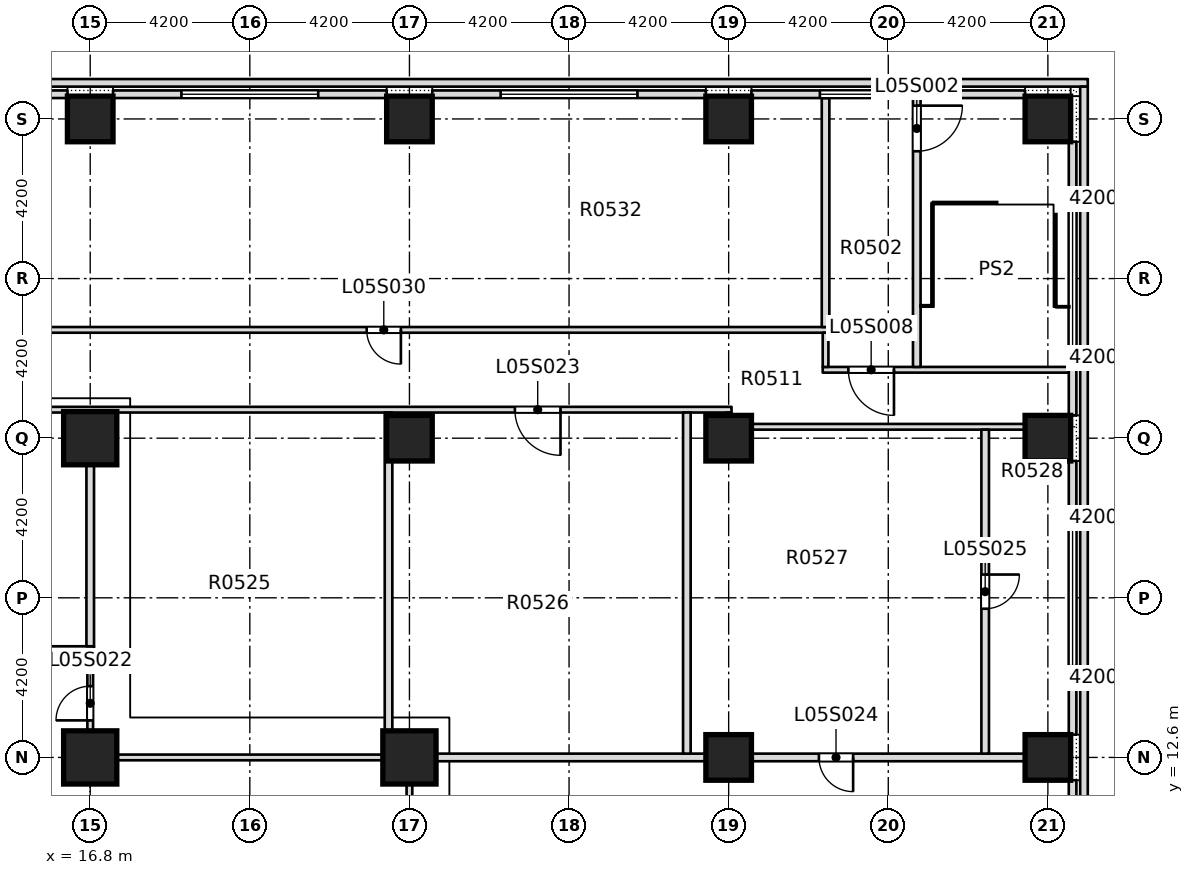
"""IFC4 building model, lengths in metres.
Left out: names, types, materials, properties, quantities, classifications, styles, units other than length and angle.
Written with IfcOpenShell. Run it as: python <this file> out.ifc"""

import sys

from ifc_helpers import new_model, si_unit, direction, frame, frame_2d, origin, origin_2d, place, context, subcontext, project, spatial, rectangle, extrude, element, fill, save


model = new_model("IFC4")
c1 = context("Model", 3, precision=1e-05, world=origin(), true_north=direction((0.0, 1.0)))
c2 = subcontext(c1, "Body", "Model", "MODEL_VIEW")
j1 = project(units=[si_unit("LENGTHUNIT", "METRE"), si_unit("PLANEANGLEUNIT", "RADIAN")], contexts=[c1])
p1 = place(None, origin())
s1 = spatial("IfcSite", under=j1, at=p1, CompositionType="ELEMENT")
p2 = place(p1, origin())
s2 = spatial("IfcBuilding", under=s1, at=p2, CompositionType="ELEMENT")
p3 = place(p2, frame((0.0, 0.0, 30.0)))
s3 = spatial("IfcBuildingStorey", under=s2, at=p3, CompositionType="ELEMENT", Elevation=30.0)
for number, where, z_axis, x_axis in (
    (1, (16.8, 12.6, -0.4), (0.0, 0.0, 1.0), (1.0, 0.0, 0.0)),
    (2, (25.2, 12.6, -0.4), (0.0, 0.0, 1.0), (1.0, 0.0, 0.0)),
    (3, (16.8, 21.0, -0.4), (0.0, 0.0, 1.0), (1.0, 0.0, 0.0)),
):
    element("IfcColumn", number, at=place(p3, frame(where, z_axis=z_axis, x_axis=x_axis)), inside=s3, PredefinedType="COLUMN", context=c2, shape_type="SweptSolid", body=[
        extrude(rectangle(XDim=1.4, YDim=1.4, at=origin_2d()), origin(), (0.0, 0.0, 1.0), 4.58),
    ])
for number, where, z_axis, x_axis in (
    (4, (33.6, 12.6, 0.0), (0.0, 0.0, 1.0), (1.0, 0.0, 0.0)),
    (5, (42.0, 12.6, 0.0), (0.0, 0.0, 1.0), (1.0, 0.0, 0.0)),
    (6, (25.2, 21.0, 0.0), (0.0, 0.0, 1.0), (1.0, 0.0, 0.0)),
    (7, (33.6, 21.0, 0.0), (0.0, 0.0, 1.0), (1.0, 0.0, 0.0)),
    (8, (42.0, 21.0, 0.0), (0.0, 0.0, 1.0), (1.0, 0.0, 0.0)),
    (9, (16.8, 29.4, 0.0), (0.0, 0.0, 1.0), (1.0, 0.0, 0.0)),
    (10, (25.2, 29.4, 0.0), (0.0, 0.0, 1.0), (1.0, 0.0, 0.0)),
    (11, (33.6, 29.4, 0.0), (0.0, 0.0, 1.0), (1.0, 0.0, 0.0)),
    (12, (42.0, 29.4, 0.0), (0.0, 0.0, 1.0), (1.0, 0.0, 0.0)),
):
    element("IfcColumn", number, at=place(p3, frame(where, z_axis=z_axis, x_axis=x_axis)), inside=s3, PredefinedType="COLUMN", context=c2, shape_type="SweptSolid", body=[
        extrude(rectangle(XDim=1.2, YDim=1.2, at=origin_2d()), origin(), (0.0, 0.0, 1.0), 4.18),
    ])
p4 = place(p3, frame((-26.25, 30.35, 4.5), z_axis=(0.0, 0.0, 1.0), x_axis=(1.0, 0.0, 0.0)))
e13 = element("IfcWall", 13, at=p4, inside=s3, PredefinedType="PARAPET", context=c2, shape_type="SweptSolid", body=[
    extrude(rectangle(XDim=69.3, YDim=0.2, at=frame_2d((34.65, 0.0))), origin(), (0.0, 0.0, 1.0), 1.2),
])
p5 = place(p3, frame((42.95, -21.85, 4.5), z_axis=(0.0, 0.0, 1.0), x_axis=(0.0, 1.0, 0.0)))
e14 = element("IfcWall", 14, at=p5, inside=s3, PredefinedType="PARAPET", context=c2, shape_type="SweptSolid", body=[
    extrude(rectangle(XDim=52.1, YDim=0.2, at=frame_2d((26.05, 0.0))), origin(), (0.0, 0.0, 1.0), 1.2),
])
p6 = place(p3, frame((16.725, 12.6, 0.0), z_axis=(0.0, 0.0, 1.0), x_axis=(1.0, 0.0, 0.0)))
e15 = element("IfcWall", 15, at=p6, inside=s3, PredefinedType="PARTITIONING", context=c2, shape_type="SweptSolid", body=[
    extrude(rectangle(XDim=8.55, YDim=0.15, at=frame_2d((4.275, 0.0))), origin(), (0.0, 0.0, 1.0), 4.18),
])
p7 = place(p3, frame((25.125, 12.6, 0.0), z_axis=(0.0, 0.0, 1.0), x_axis=(1.0, 0.0, 0.0)))
e16 = element("IfcWall", 16, at=p7, inside=s3, PredefinedType="PARTITIONING", context=c2, shape_type="SweptSolid", body=[
    extrude(rectangle(XDim=17.425, YDim=0.2, at=frame_2d((8.712, 0.0))), origin(), (0.0, 0.0, 1.0), 4.18),
])
p8 = place(p7, frame((10.85, 0.0, 0.0)))
e17 = element("IfcOpeningElement", 17, at=p8, cuts=e16, PredefinedType="OPENING", context=c2, shape_type="SweptSolid", body=[
    extrude(rectangle(XDim=0.9, YDim=2.1, at=frame_2d((0.45, 1.05))), frame((0.0, 0.11, 0.0), z_axis=(0.0, -1.0, 0.0), x_axis=(1.0, 0.0, 0.0)), (0.0, 0.0, 1.0), 0.22),
])
p9 = place(p3, frame((12.601, 15.45, 0.0), z_axis=(0.0, 0.0, 1.0), x_axis=(1.0, 0.0, 0.0)))
e18 = element("IfcWall", 18, at=p9, inside=s3, PredefinedType="PARTITIONING", context=c2, shape_type="SweptSolid", body=[
    extrude(rectangle(XDim=4.299, YDim=0.15, at=frame_2d((2.149, 0.0))), origin(), (0.0, 0.0, 1.0), 4.18),
])
p10 = place(p9, frame((1.549, 0.0, 0.0)))
e19 = element("IfcOpeningElement", 19, at=p10, cuts=e18, PredefinedType="OPENING", context=c2, shape_type="SweptSolid", body=[
    extrude(rectangle(XDim=1.1, YDim=2.1, at=frame_2d((0.55, 1.05))), frame((0.0, 0.085, 0.0), z_axis=(0.0, -1.0, 0.0), x_axis=(1.0, 0.0, 0.0)), (0.0, 0.0, 1.0), 0.17),
])
p11 = place(p3, frame((33.525, 21.3, 0.0), z_axis=(0.0, 0.0, 1.0), x_axis=(1.0, 0.0, 0.0)))
e20 = element("IfcWall", 20, at=p11, inside=s3, PredefinedType="PARTITIONING", context=c2, shape_type="SweptSolid", body=[
    extrude(rectangle(XDim=9.025, YDim=0.15, at=frame_2d((4.513, 0.0))), origin(), (0.0, 0.0, 1.0), 4.18),
])
p12 = place(p3, frame((12.601, 21.75, 0.0), z_axis=(0.0, 0.0, 1.0), x_axis=(1.0, 0.0, 0.0)))
e21 = element("IfcWall", 21, at=p12, inside=s3, PredefinedType="PARTITIONING", context=c2, shape_type="SweptSolid", body=[
    extrude(rectangle(XDim=21.074, YDim=0.15, at=frame_2d((10.537, 0.0))), origin(), (0.0, 0.0, 1.0), 4.18),
])
p13 = place(p12, frame((15.374, 0.0, 0.0)))
e22 = element("IfcOpeningElement", 22, at=p13, cuts=e21, PredefinedType="OPENING", context=c2, shape_type="SweptSolid", body=[
    extrude(rectangle(XDim=1.2, YDim=2.1, at=frame_2d((0.6, 1.05))), frame((0.0, 0.085, 0.0), z_axis=(0.0, -1.0, 0.0), x_axis=(1.0, 0.0, 0.0)), (0.0, 0.0, 1.0), 0.17),
])
p14 = place(p3, frame((36.075, 22.8, 0.0), z_axis=(0.0, 0.0, 1.0), x_axis=(1.0, 0.0, 0.0)))
e23 = element("IfcWall", 23, at=p14, inside=s3, PredefinedType="PARTITIONING", context=c2, shape_type="SweptSolid", body=[
    extrude(rectangle(XDim=6.475, YDim=0.15, at=frame_2d((3.238, 0.0))), origin(), (0.0, 0.0, 1.0), 4.18),
])
p15 = place(p14, frame((0.675, 0.0, 0.0)))
e24 = element("IfcOpeningElement", 24, at=p15, cuts=e23, PredefinedType="OPENING", context=c2, shape_type="SweptSolid", body=[
    extrude(rectangle(XDim=1.2, YDim=2.1, at=frame_2d((0.6, 1.05))), frame((0.0, 0.085, 0.0), z_axis=(0.0, -1.0, 0.0), x_axis=(1.0, 0.0, 0.0)), (0.0, 0.0, 1.0), 0.17),
])
p16 = place(p3, frame((8.65, 23.85, 0.0), z_axis=(0.0, 0.0, 1.0), x_axis=(1.0, 0.0, 0.0)))
e25 = element("IfcWall", 25, at=p16, inside=s3, PredefinedType="PARTITIONING", context=c2, shape_type="SweptSolid", body=[
    extrude(rectangle(XDim=27.6, YDim=0.15, at=frame_2d((13.8, 0.0))), origin(), (0.0, 0.0, 1.0), 4.18),
])
p17 = place(p16, frame((1.7, 0.0, 0.0)))
e26 = element("IfcOpeningElement", 26, at=p17, cuts=e25, PredefinedType="OPENING", context=c2, shape_type="SweptSolid", body=[
    extrude(rectangle(XDim=0.9, YDim=2.1, at=frame_2d((0.45, 1.05))), frame((0.0, 0.085, 0.0), z_axis=(0.0, -1.0, 0.0), x_axis=(1.0, 0.0, 0.0)), (0.0, 0.0, 1.0), 0.17),
])
p18 = place(p16, frame((15.425, 0.0, 0.0)))
e27 = element("IfcOpeningElement", 27, at=p18, cuts=e25, PredefinedType="OPENING", context=c2, shape_type="SweptSolid", body=[
    extrude(rectangle(XDim=0.9, YDim=2.1, at=frame_2d((0.45, 1.05))), frame((0.0, 0.085, 0.0), z_axis=(0.0, -1.0, 0.0), x_axis=(1.0, 0.0, 0.0)), (0.0, 0.0, 1.0), 0.17),
])
p19 = place(p3, frame((16.8, 12.675, 0.0), z_axis=(0.0, 0.0, 1.0), x_axis=(0.0, 1.0, 0.0)))
e28 = element("IfcWall", 28, at=p19, inside=s3, PredefinedType="PARTITIONING", context=c2, shape_type="SweptSolid", body=[
    extrude(rectangle(XDim=2.7, YDim=0.15, at=frame_2d((1.35, 0.0))), origin(), (0.0, 0.0, 1.0), 4.18),
])
p20 = place(p19, frame((0.9, 0.0, 0.0)))
e29 = element("IfcOpeningElement", 29, at=p20, cuts=e28, PredefinedType="OPENING", context=c2, shape_type="SweptSolid", body=[
    extrude(rectangle(XDim=0.9, YDim=2.1, at=frame_2d((0.45, 1.05))), frame((0.0, 0.085, 0.0), z_axis=(0.0, -1.0, 0.0), x_axis=(1.0, 0.0, 0.0)), (0.0, 0.0, 1.0), 0.17),
])
p21 = place(p3, frame((16.8, 15.525, 0.0), z_axis=(0.0, 0.0, 1.0), x_axis=(0.0, 1.0, 0.0)))
e30 = element("IfcWall", 30, at=p21, inside=s3, PredefinedType="PARTITIONING", context=c2, shape_type="SweptSolid", body=[
    extrude(rectangle(XDim=6.15, YDim=0.2, at=frame_2d((3.075, 0.0))), origin(), (0.0, 0.0, 1.0), 4.18),
])
p22 = place(p3, frame((24.65, 12.675, 0.0), z_axis=(0.0, 0.0, 1.0), x_axis=(0.0, 1.0, 0.0)))
e31 = element("IfcWall", 31, at=p22, inside=s3, PredefinedType="PARTITIONING", context=c2, shape_type="SweptSolid", body=[
    extrude(rectangle(XDim=9.0, YDim=0.2, at=frame_2d((4.5, 0.0))), origin(), (0.0, 0.0, 1.0), 4.18),
])
p23 = place(p3, frame((25.2, -11.8, 0.0), z_axis=(0.0, 0.0, 1.0), x_axis=(0.0, 1.0, 0.0)))
e32 = element("IfcWall", 32, at=p23, inside=s3, PredefinedType="PARTITIONING", context=c2, shape_type="SweptSolid", body=[
    extrude(rectangle(XDim=24.3, YDim=0.15, at=frame_2d((12.15, 0.0))), origin(), (0.0, 0.0, 1.0), 4.18),
])
p24 = place(p23, frame((11.25, 0.0, 0.0)))
e33 = element("IfcOpeningElement", 33, at=p24, cuts=e32, PredefinedType="OPENING", context=c2, shape_type="SweptSolid", body=[
    extrude(rectangle(XDim=1.8, YDim=2.1, at=frame_2d((0.9, 1.05))), frame((0.0, 0.085, 0.0), z_axis=(0.0, -1.0, 0.0), x_axis=(1.0, 0.0, 0.0)), (0.0, 0.0, 1.0), 0.17),
])
p25 = place(p3, frame((32.5, 12.7, 0.0), z_axis=(0.0, 0.0, 1.0), x_axis=(0.0, 1.0, 0.0)))
e34 = element("IfcWall", 34, at=p25, inside=s3, PredefinedType="PARTITIONING", context=c2, shape_type="SweptSolid", body=[
    extrude(rectangle(XDim=8.975, YDim=0.2, at=frame_2d((4.488, 0.0))), origin(), (0.0, 0.0, 1.0), 4.18),
])
p26 = place(p3, frame((33.6, 21.375, 0.0), z_axis=(0.0, 0.0, 1.0), x_axis=(0.0, 1.0, 0.0)))
e35 = element("IfcWall", 35, at=p26, inside=s3, PredefinedType="PARTITIONING", context=c2, shape_type="SweptSolid", body=[
    extrude(rectangle(XDim=0.3, YDim=0.15, at=frame_2d((0.15, 0.0))), origin(), (0.0, 0.0, 1.0), 4.18),
])
p27 = place(p3, frame((36.15, 22.875, 0.0), z_axis=(0.0, 0.0, 1.0), x_axis=(0.0, 1.0, 0.0)))
e36 = element("IfcWall", 36, at=p27, inside=s3, PredefinedType="PARTITIONING", context=c2, shape_type="SweptSolid", body=[
    extrude(rectangle(XDim=0.9, YDim=0.15, at=frame_2d((0.45, 0.0))), origin(), (0.0, 0.0, 1.0), 4.18),
])
p28 = place(p3, frame((36.15, 23.925, 0.0), z_axis=(0.0, 0.0, 1.0), x_axis=(0.0, 1.0, 0.0)))
e37 = element("IfcWall", 37, at=p28, inside=s3, PredefinedType="PARTITIONING", context=c2, shape_type="SweptSolid", body=[
    extrude(rectangle(XDim=6.025, YDim=0.2, at=frame_2d((3.012, 0.0))), origin(), (0.0, 0.0, 1.0), 4.18),
])
p29 = place(p3, frame((38.55, 22.875, 0.0), z_axis=(0.0, 0.0, 1.0), x_axis=(0.0, 1.0, 0.0)))
e38 = element("IfcWall", 38, at=p29, inside=s3, PredefinedType="PARTITIONING", context=c2, shape_type="SweptSolid", body=[
    extrude(rectangle(XDim=7.075, YDim=0.2, at=frame_2d((3.538, 0.0))), origin(), (0.0, 0.0, 1.0), 4.18),
])
p30 = place(p29, frame((5.675, 0.0, 0.0)))
e39 = element("IfcOpeningElement", 39, at=p30, cuts=e38, PredefinedType="OPENING", context=c2, shape_type="SweptSolid", body=[
    extrude(rectangle(XDim=1.2, YDim=2.1, at=frame_2d((0.6, 1.05))), frame((0.0, 0.11, 0.0), z_axis=(0.0, -1.0, 0.0), x_axis=(1.0, 0.0, 0.0)), (0.0, 0.0, 1.0), 0.22),
])
p31 = place(p3, frame((40.35, 12.7, 0.0), z_axis=(0.0, 0.0, 1.0), x_axis=(0.0, 1.0, 0.0)))
e40 = element("IfcWall", 40, at=p31, inside=s3, PredefinedType="PARTITIONING", context=c2, shape_type="SweptSolid", body=[
    extrude(rectangle(XDim=8.525, YDim=0.2, at=frame_2d((4.263, 0.0))), origin(), (0.0, 0.0, 1.0), 4.18),
])
p32 = place(p31, frame((3.812, 0.0, 0.0)))
e41 = element("IfcOpeningElement", 41, at=p32, cuts=e40, PredefinedType="OPENING", context=c2, shape_type="SweptSolid", body=[
    extrude(rectangle(XDim=0.9, YDim=2.1, at=frame_2d((0.45, 1.05))), frame((0.0, 0.11, 0.0), z_axis=(0.0, -1.0, 0.0), x_axis=(1.0, 0.0, 0.0)), (0.0, 0.0, 1.0), 0.22),
])
p33 = place(p3, frame((42.65, 4.8, 0.0), z_axis=(0.0, 0.0, 1.0), x_axis=(0.0, 1.0, 0.0)))
e42 = element("IfcWall", 42, at=p33, inside=s3, PredefinedType="STANDARD", context=c2, shape_type="SweptSolid", body=[
    extrude(rectangle(XDim=7.2, YDim=0.2, at=frame_2d((3.6, 0.0))), origin(), (0.0, 0.0, 1.0), 4.18),
])
p34 = place(p33, frame((1.8, 0.0, 0.9)))
e43 = element("IfcOpeningElement", 43, at=p34, cuts=e42, PredefinedType="OPENING", context=c2, shape_type="SweptSolid", body=[
    extrude(rectangle(XDim=3.6, YDim=2.4, at=frame_2d((1.8, 1.2))), frame((0.0, 0.11, 0.0), z_axis=(0.0, -1.0, 0.0), x_axis=(1.0, 0.0, 0.0)), (0.0, 0.0, 1.0), 0.22),
])
p35 = place(p3, frame((42.65, 13.2, 0.0), z_axis=(0.0, 0.0, 1.0), x_axis=(0.0, 1.0, 0.0)))
e44 = element("IfcWall", 44, at=p35, inside=s3, PredefinedType="STANDARD", context=c2, shape_type="SweptSolid", body=[
    extrude(rectangle(XDim=7.2, YDim=0.2, at=frame_2d((3.6, 0.0))), origin(), (0.0, 0.0, 1.0), 4.18),
])
p36 = place(p35, frame((1.8, 0.0, 0.9)))
e45 = element("IfcOpeningElement", 45, at=p36, cuts=e44, PredefinedType="OPENING", context=c2, shape_type="SweptSolid", body=[
    extrude(rectangle(XDim=3.6, YDim=2.4, at=frame_2d((1.8, 1.2))), frame((0.0, 0.11, 0.0), z_axis=(0.0, -1.0, 0.0), x_axis=(1.0, 0.0, 0.0)), (0.0, 0.0, 1.0), 0.22),
])
p37 = place(p3, frame((42.65, 21.6, 0.0), z_axis=(0.0, 0.0, 1.0), x_axis=(0.0, 1.0, 0.0)))
e46 = element("IfcWall", 46, at=p37, inside=s3, PredefinedType="STANDARD", context=c2, shape_type="SweptSolid", body=[
    extrude(rectangle(XDim=7.2, YDim=0.2, at=frame_2d((3.6, 0.0))), origin(), (0.0, 0.0, 1.0), 4.18),
])
p38 = place(p37, frame((1.8, 0.0, 0.9)))
e47 = element("IfcOpeningElement", 47, at=p38, cuts=e46, PredefinedType="OPENING", context=c2, shape_type="SweptSolid", body=[
    extrude(rectangle(XDim=3.6, YDim=2.4, at=frame_2d((1.8, 1.2))), frame((0.0, 0.11, 0.0), z_axis=(0.0, -1.0, 0.0), x_axis=(1.0, 0.0, 0.0)), (0.0, 0.0, 1.0), 0.22),
])
p39 = place(p3, frame((41.4, 30.05, 0.0), z_axis=(0.0, 0.0, 1.0), x_axis=(-1.0, 0.0, 0.0)))
e48 = element("IfcWall", 48, at=p39, inside=s3, PredefinedType="STANDARD", context=c2, shape_type="SweptSolid", body=[
    extrude(rectangle(XDim=7.2, YDim=0.2, at=frame_2d((3.6, 0.0))), origin(), (0.0, 0.0, 1.0), 4.18),
])
p40 = place(p39, frame((1.8, 0.0, 0.9)))
e49 = element("IfcOpeningElement", 49, at=p40, cuts=e48, PredefinedType="OPENING", context=c2, shape_type="SweptSolid", body=[
    extrude(rectangle(XDim=3.6, YDim=2.4, at=frame_2d((1.8, 1.2))), frame((0.0, 0.11, 0.0), z_axis=(0.0, -1.0, 0.0), x_axis=(1.0, 0.0, 0.0)), (0.0, 0.0, 1.0), 0.22),
])
p41 = place(p3, frame((33.0, 30.05, 0.0), z_axis=(0.0, 0.0, 1.0), x_axis=(-1.0, 0.0, 0.0)))
e50 = element("IfcWall", 50, at=p41, inside=s3, PredefinedType="STANDARD", context=c2, shape_type="SweptSolid", body=[
    extrude(rectangle(XDim=7.2, YDim=0.2, at=frame_2d((3.6, 0.0))), origin(), (0.0, 0.0, 1.0), 4.18),
])
p42 = place(p41, frame((1.8, 0.0, 0.9)))
e51 = element("IfcOpeningElement", 51, at=p42, cuts=e50, PredefinedType="OPENING", context=c2, shape_type="SweptSolid", body=[
    extrude(rectangle(XDim=3.6, YDim=2.4, at=frame_2d((1.8, 1.2))), frame((0.0, 0.11, 0.0), z_axis=(0.0, -1.0, 0.0), x_axis=(1.0, 0.0, 0.0)), (0.0, 0.0, 1.0), 0.22),
])
p43 = place(p3, frame((24.6, 30.05, 0.0), z_axis=(0.0, 0.0, 1.0), x_axis=(-1.0, 0.0, 0.0)))
e52 = element("IfcWall", 52, at=p43, inside=s3, PredefinedType="STANDARD", context=c2, shape_type="SweptSolid", body=[
    extrude(rectangle(XDim=7.2, YDim=0.2, at=frame_2d((3.6, 0.0))), origin(), (0.0, 0.0, 1.0), 4.18),
])
p44 = place(p43, frame((1.8, 0.0, 0.9)))
e53 = element("IfcOpeningElement", 53, at=p44, cuts=e52, PredefinedType="OPENING", context=c2, shape_type="SweptSolid", body=[
    extrude(rectangle(XDim=3.6, YDim=2.4, at=frame_2d((1.8, 1.2))), frame((0.0, 0.11, 0.0), z_axis=(0.0, -1.0, 0.0), x_axis=(1.0, 0.0, 0.0)), (0.0, 0.0, 1.0), 0.22),
])
p45 = place(p3, frame((16.2, 30.05, 0.0), z_axis=(0.0, 0.0, 1.0), x_axis=(-1.0, 0.0, 0.0)))
e54 = element("IfcWall", 54, at=p45, inside=s3, PredefinedType="STANDARD", context=c2, shape_type="SweptSolid", body=[
    extrude(rectangle(XDim=7.2, YDim=0.2, at=frame_2d((3.6, 0.0))), origin(), (0.0, 0.0, 1.0), 4.18),
])
p46 = place(p45, frame((1.8, 0.0, 0.9)))
e55 = element("IfcOpeningElement", 55, at=p46, cuts=e54, PredefinedType="OPENING", context=c2, shape_type="SweptSolid", body=[
    extrude(rectangle(XDim=3.6, YDim=2.4, at=frame_2d((1.8, 1.2))), frame((0.0, 0.11, 0.0), z_axis=(0.0, -1.0, 0.0), x_axis=(1.0, 0.0, 0.0)), (0.0, 0.0, 1.0), 0.22),
])
p47 = place(p30, origin())
e56 = element("IfcDoor", 56, at=p47, inside=s3, OperationType="DOUBLE_DOOR_SINGLE_SWING", PredefinedType="DOOR", context=c2, shape_type="SweptSolid", body=[
    extrude(rectangle(XDim=1.2, YDim=2.1, at=frame_2d((0.6, 1.05))), frame((0.0, 0.025, 0.0), z_axis=(0.0, -1.0, 0.0), x_axis=(1.0, 0.0, 0.0)), (0.0, 0.0, 1.0), 0.05),
])
fill(e39, e56)
p48 = place(p15, origin())
e57 = element("IfcDoor", 57, at=p48, inside=s3, OperationType="SINGLE_SWING_LEFT", PredefinedType="DOOR", context=c2, shape_type="SweptSolid", body=[
    extrude(rectangle(XDim=1.2, YDim=2.1, at=frame_2d((0.6, 1.05))), frame((0.0, 0.025, 0.0), z_axis=(0.0, -1.0, 0.0), x_axis=(1.0, 0.0, 0.0)), (0.0, 0.0, 1.0), 0.05),
])
fill(e24, e57)
p49 = place(p20, origin())
e58 = element("IfcDoor", 58, at=p49, inside=s3, OperationType="SINGLE_SWING_RIGHT", PredefinedType="DOOR", context=c2, shape_type="SweptSolid", body=[
    extrude(rectangle(XDim=0.9, YDim=2.1, at=frame_2d((0.45, 1.05))), frame((0.0, 0.025, 0.0), z_axis=(0.0, -1.0, 0.0), x_axis=(1.0, 0.0, 0.0)), (0.0, 0.0, 1.0), 0.05),
])
fill(e29, e58)
p50 = place(p13, origin())
e59 = element("IfcDoor", 59, at=p50, inside=s3, OperationType="SINGLE_SWING_RIGHT", PredefinedType="DOOR", context=c2, shape_type="SweptSolid", body=[
    extrude(rectangle(XDim=1.2, YDim=2.1, at=frame_2d((0.6, 1.05))), frame((0.0, 0.025, 0.0), z_axis=(0.0, -1.0, 0.0), x_axis=(1.0, 0.0, 0.0)), (0.0, 0.0, 1.0), 0.05),
])
fill(e22, e59)
p51 = place(p8, origin())
e60 = element("IfcDoor", 60, at=p51, inside=s3, OperationType="SINGLE_SWING_RIGHT", PredefinedType="DOOR", context=c2, shape_type="SweptSolid", body=[
    extrude(rectangle(XDim=0.9, YDim=2.1, at=frame_2d((0.45, 1.05))), frame((0.0, 0.025, 0.0), z_axis=(0.0, -1.0, 0.0), x_axis=(1.0, 0.0, 0.0)), (0.0, 0.0, 1.0), 0.05),
])
fill(e17, e60)
p52 = place(p32, origin())
e61 = element("IfcDoor", 61, at=p52, inside=s3, OperationType="SINGLE_SWING_RIGHT", PredefinedType="DOOR", context=c2, shape_type="SweptSolid", body=[
    extrude(rectangle(XDim=0.9, YDim=2.1, at=frame_2d((0.45, 1.05))), frame((0.0, 0.025, 0.0), z_axis=(0.0, -1.0, 0.0), x_axis=(1.0, 0.0, 0.0)), (0.0, 0.0, 1.0), 0.05),
])
fill(e41, e61)
p53 = place(p18, origin())
e62 = element("IfcDoor", 62, at=p53, inside=s3, OperationType="SINGLE_SWING_LEFT", PredefinedType="DOOR", context=c2, shape_type="SweptSolid", body=[
    extrude(rectangle(XDim=0.9, YDim=2.1, at=frame_2d((0.45, 1.05))), frame((0.0, 0.025, 0.0), z_axis=(0.0, -1.0, 0.0), x_axis=(1.0, 0.0, 0.0)), (0.0, 0.0, 1.0), 0.05),
])
fill(e27, e62)
p54 = place(p36, origin())
e63 = element("IfcWindow", 63, at=p54, inside=s3, PartitioningType="SINGLE_PANEL", PredefinedType="WINDOW", context=c2, shape_type="SweptSolid", body=[
    extrude(rectangle(XDim=3.6, YDim=2.4, at=frame_2d((1.8, 1.2))), frame((0.0, 0.03, 0.0), z_axis=(0.0, -1.0, 0.0), x_axis=(1.0, 0.0, 0.0)), (0.0, 0.0, 1.0), 0.06),
])
fill(e45, e63)
p55 = place(p38, origin())
e64 = element("IfcWindow", 64, at=p55, inside=s3, PartitioningType="SINGLE_PANEL", PredefinedType="WINDOW", context=c2, shape_type="SweptSolid", body=[
    extrude(rectangle(XDim=3.6, YDim=2.4, at=frame_2d((1.8, 1.2))), frame((0.0, 0.03, 0.0), z_axis=(0.0, -1.0, 0.0), x_axis=(1.0, 0.0, 0.0)), (0.0, 0.0, 1.0), 0.06),
])
fill(e47, e64)
p56 = place(p40, origin())
e65 = element("IfcWindow", 65, at=p56, inside=s3, PartitioningType="SINGLE_PANEL", PredefinedType="WINDOW", context=c2, shape_type="SweptSolid", body=[
    extrude(rectangle(XDim=3.6, YDim=2.4, at=frame_2d((1.8, 1.2))), frame((0.0, 0.03, 0.0), z_axis=(0.0, -1.0, 0.0), x_axis=(1.0, 0.0, 0.0)), (0.0, 0.0, 1.0), 0.06),
])
fill(e49, e65)
p57 = place(p42, origin())
e66 = element("IfcWindow", 66, at=p57, inside=s3, PartitioningType="SINGLE_PANEL", PredefinedType="WINDOW", context=c2, shape_type="SweptSolid", body=[
    extrude(rectangle(XDim=3.6, YDim=2.4, at=frame_2d((1.8, 1.2))), frame((0.0, 0.03, 0.0), z_axis=(0.0, -1.0, 0.0), x_axis=(1.0, 0.0, 0.0)), (0.0, 0.0, 1.0), 0.06),
])
fill(e51, e66)
p58 = place(p44, origin())
e67 = element("IfcWindow", 67, at=p58, inside=s3, PartitioningType="SINGLE_PANEL", PredefinedType="WINDOW", context=c2, shape_type="SweptSolid", body=[
    extrude(rectangle(XDim=3.6, YDim=2.4, at=frame_2d((1.8, 1.2))), frame((0.0, 0.03, 0.0), z_axis=(0.0, -1.0, 0.0), x_axis=(1.0, 0.0, 0.0)), (0.0, 0.0, 1.0), 0.06),
])
fill(e53, e67)
save(model, sys.argv[1])
